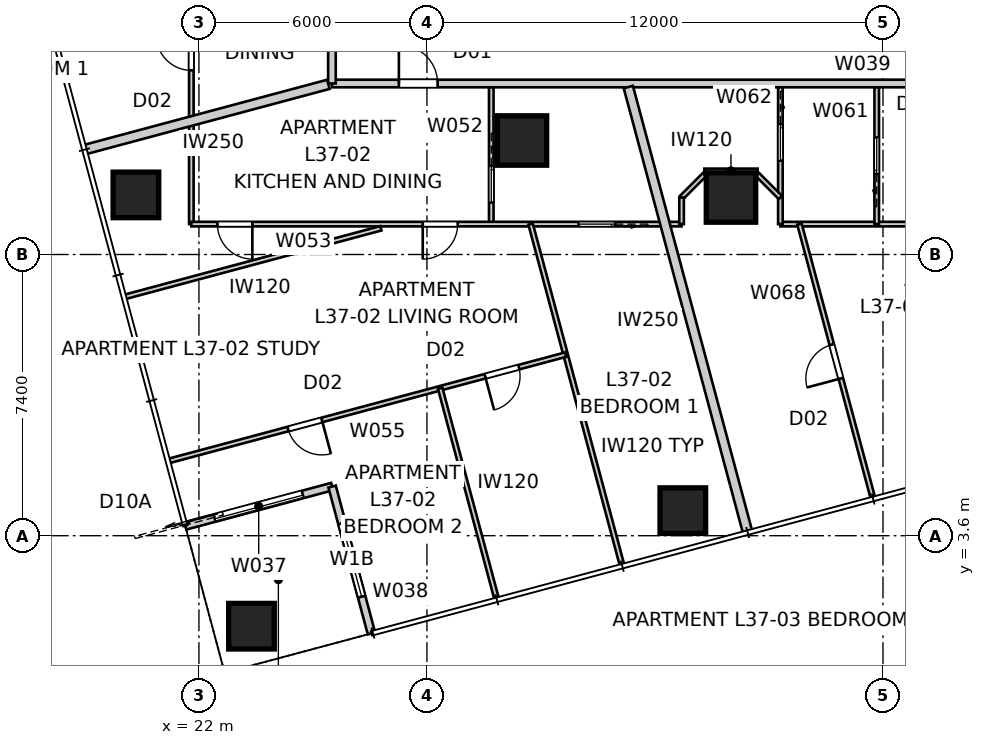
"""IFC4 building model, lengths in metres.
Left out: names, types, materials, properties, quantities, classifications, styles, units other than length and angle.
Written with IfcOpenShell. Run it as: python <this file> out.ifc"""

import sys

from ifc_helpers import new_model, si_unit, direction, frame, frame_2d, origin, origin_2d, place, context, subcontext, project, spatial, rectangle, extrude, element, fill, save


model = new_model("IFC4")
c1 = context("Model", 3, precision=1e-05, world=origin(), true_north=direction((0.0, 1.0)))
c2 = subcontext(c1, "Body", "Model", "MODEL_VIEW")
j1 = project(units=[si_unit("LENGTHUNIT", "METRE"), si_unit("PLANEANGLEUNIT", "RADIAN")], contexts=[c1])
p1 = place(None, origin())
s1 = spatial("IfcSite", under=j1, at=p1, CompositionType="ELEMENT")
p2 = place(p1, origin())
s2 = spatial("IfcBuilding", under=s1, at=p2, CompositionType="ELEMENT")
p3 = place(p2, frame((0.0, 0.0, 135.4)))
s3 = spatial("IfcBuildingStorey", under=s2, at=p3, CompositionType="ELEMENT", Elevation=135.4)
for number, where, z_axis, x_axis in (
    (1, (23.383, 1.219, 0.0), (0.0, 0.0, 1.0), (1.0, 0.0, 0.0)),
    (2, (34.733, 4.26, 0.0), (0.0, 0.0, 1.0), (1.0, 0.0, 0.0)),
    (3, (20.342, 12.568, 0.0), (0.0, 0.0, 1.0), (1.0, 0.0, 0.0)),
):
    element("IfcColumn", number, at=place(p3, frame(where, z_axis=z_axis, x_axis=x_axis)), inside=s3, PredefinedType="COLUMN", context=c2, shape_type="SweptSolid", body=[
        extrude(rectangle(XDim=1.2, YDim=1.2, at=origin_2d()), origin(), (0.0, 0.0, 1.0), 3.2),
    ])
for number, where, z_axis, x_axis in (
    (4, (30.5, 14.0, 0.0), (0.0, 0.0, 1.0), (1.0, 0.0, 0.0)),
    (5, (36.0, 12.5, 0.0), (0.0, 0.0, 1.0), (1.0, 0.0, 0.0)),
):
    element("IfcColumn", number, at=place(p3, frame(where, z_axis=z_axis, x_axis=x_axis)), inside=s3, PredefinedType="COLUMN", context=c2, shape_type="SweptSolid", body=[
        extrude(rectangle(XDim=1.3, YDim=1.3, at=origin_2d()), origin(), (0.0, 0.0, 1.0), 3.4),
    ])
p4 = place(p3, frame((21.641, 3.857, 0.0), z_axis=(0.0, 0.0, 1.0), x_axis=(0.965919172068, 0.258843877716, 0.0)))
e6 = element("IfcWall", 6, at=p4, inside=s3, PredefinedType="SOLIDWALL", context=c2, shape_type="SweptSolid", body=[
    extrude(rectangle(XDim=4.0, YDim=0.2, at=frame_2d((2.0, 0.0))), origin(), (0.0, 0.0, 1.0), 3.2),
])
p5 = place(p4, frame((0.8, 0.0, 0.0)))
e7 = element("IfcOpeningElement", 7, at=p5, cuts=e6, PredefinedType="OPENING", context=c2, shape_type="SweptSolid", body=[
    extrude(rectangle(XDim=2.4, YDim=2.1, at=frame_2d((1.2, 1.05))), frame((0.0, 0.11, 0.0), z_axis=(0.0, -1.0, 0.0), x_axis=(1.0, 0.0, 0.0)), (0.0, 0.0, 1.0), 0.22),
])
p6 = place(p3, frame((25.504, 4.893, 0.0), z_axis=(0.0, 0.0, 1.0), x_axis=(0.258786931944, -0.965934430412, 0.0)))
e8 = element("IfcWall", 8, at=p6, inside=s3, PredefinedType="SOLIDWALL", context=c2, shape_type="SweptSolid", body=[
    extrude(rectangle(XDim=4.0, YDim=0.2, at=frame_2d((2.0, 0.0))), origin(), (0.0, 0.0, 1.0), 3.2),
])
p7 = place(p6, frame((1.0, 0.0, 0.4)))
e9 = element("IfcOpeningElement", 9, at=p7, cuts=e8, PredefinedType="OPENING", context=c2, shape_type="SweptSolid", body=[
    extrude(rectangle(XDim=2.0, YDim=1.8, at=frame_2d((1.0, 0.9))), frame((0.0, 0.11, 0.0), z_axis=(0.0, -1.0, 0.0), x_axis=(1.0, 0.0, 0.0)), (0.0, 0.0, 1.0), 0.22),
])
p8 = place(p3, frame((25.5, 15.5, 0.0), z_axis=(0.0, 0.0, 1.0), x_axis=(1.0, 0.0, 0.0)))
e10 = element("IfcWall", 10, at=p8, inside=s3, PredefinedType="PARTITIONING", context=c2, shape_type="SweptSolid", body=[
    extrude(rectangle(XDim=29.0, YDim=0.2, at=frame_2d((14.5, 0.0))), origin(), (0.0, 0.0, 1.0), 3.2),
])
p9 = place(p8, frame((25.146, 0.0, 0.0)))
e11 = element("IfcOpeningElement", 11, at=p9, cuts=e10, PredefinedType="OPENING", context=c2, shape_type="SweptSolid", body=[
    extrude(rectangle(XDim=1.02, YDim=2.0, at=frame_2d((0.51, 1.0))), frame((0.0, 0.11, 0.0), z_axis=(0.0, -1.0, 0.0), x_axis=(1.0, 0.0, 0.0)), (0.0, 0.0, 1.0), 0.22),
])
p10 = place(p8, frame((1.761, 0.0, 0.0)))
e12 = element("IfcOpeningElement", 12, at=p10, cuts=e10, PredefinedType="OPENING", context=c2, shape_type="SweptSolid", body=[
    extrude(rectangle(XDim=1.02, YDim=2.34, at=frame_2d((0.51, 1.17))), frame((0.0, 0.11, 0.0), z_axis=(0.0, -1.0, 0.0), x_axis=(1.0, 0.0, 0.0)), (0.0, 0.0, 1.0), 0.22),
])
p11 = place(p3, frame((25.5, 43.7, 0.0), z_axis=(0.0, 0.0, 1.0), x_axis=(0.0, -1.0, 0.0)))
e13 = element("IfcWall", 13, at=p11, inside=s3, PredefinedType="PARTITIONING", context=c2, shape_type="SweptSolid", body=[
    extrude(rectangle(XDim=28.2, YDim=0.2, at=frame_2d((14.1, 0.0))), origin(), (0.0, 0.0, 1.0), 3.2),
])
p12 = place(p11, frame((24.646, 0.0, 0.0)))
e14 = element("IfcOpeningElement", 14, at=p12, cuts=e13, PredefinedType="OPENING", context=c2, shape_type="SweptSolid", body=[
    extrude(rectangle(XDim=1.02, YDim=2.0, at=frame_2d((0.51, 1.0))), frame((0.0, 0.11, 0.0), z_axis=(0.0, -1.0, 0.0), x_axis=(1.0, 0.0, 0.0)), (0.0, 0.0, 1.0), 0.22),
])
p13 = place(p11, frame((14.858, 0.0, 0.0)))
e15 = element("IfcOpeningElement", 15, at=p13, cuts=e13, PredefinedType="OPENING", context=c2, shape_type="SweptSolid", body=[
    extrude(rectangle(XDim=1.02, YDim=2.34, at=frame_2d((0.51, 1.17))), frame((0.0, 0.11, 0.0), z_axis=(0.0, -1.0, 0.0), x_axis=(1.0, 0.0, 0.0)), (0.0, 0.0, 1.0), 0.22),
])
p14 = place(p11, frame((1.347, 0.0, 0.0)))
e16 = element("IfcOpeningElement", 16, at=p14, cuts=e13, PredefinedType="OPENING", context=c2, shape_type="SweptSolid", body=[
    extrude(rectangle(XDim=1.02, YDim=2.0, at=frame_2d((0.51, 1.0))), frame((0.0, 0.11, 0.0), z_axis=(0.0, -1.0, 0.0), x_axis=(1.0, 0.0, 0.0)), (0.0, 0.0, 1.0), 0.22),
])
p15 = place(p3, frame((36.44, 3.682, 0.0), z_axis=(0.0, 0.0, 1.0), x_axis=(-0.258824223352, 0.965924438766, 0.0)))
e17 = element("IfcWall", 17, at=p15, inside=s3, PredefinedType="PARTITIONING", context=c2, shape_type="SweptSolid", body=[
    extrude(rectangle(XDim=12.138, YDim=0.25, at=frame_2d((6.069, 0.0))), origin(), (0.0, 0.0, 1.0), 3.2),
])
p16 = place(p3, frame((18.988, 13.758, 0.0), z_axis=(0.0, 0.0, 1.0), x_axis=(0.965929355837, 0.25880587229, 0.0)))
e18 = element("IfcWall", 18, at=p16, inside=s3, PredefinedType="PARTITIONING", context=c2, shape_type="SweptSolid", body=[
    extrude(rectangle(XDim=6.645, YDim=0.25, at=frame_2d((3.322, 0.0))), origin(), (0.0, 0.0, 1.0), 3.2),
])
p17 = place(p3, frame((21.8, 11.8, 0.0), z_axis=(0.0, 0.0, 1.0), x_axis=(0.0, 1.0, 0.0)))
e19 = element("IfcWall", 19, at=p17, inside=s3, PredefinedType="PARTITIONING", context=c2, shape_type="SweptSolid", body=[
    extrude(rectangle(XDim=21.116, YDim=0.12, at=frame_2d((10.558, 0.0))), origin(), (0.0, 0.0, 1.0), 3.2),
])
p18 = place(p17, frame((4.046, 0.0, 0.0)))
e20 = element("IfcOpeningElement", 20, at=p18, cuts=e19, PredefinedType="OPENING", context=c2, shape_type="SweptSolid", body=[
    extrude(rectangle(XDim=0.92, YDim=2.34, at=frame_2d((0.46, 1.17))), frame((0.0, 0.07, 0.0), z_axis=(0.0, -1.0, 0.0), x_axis=(1.0, 0.0, 0.0)), (0.0, 0.0, 1.0), 0.14),
])
p19 = place(p17, frame((7.358, 0.0, 0.0)))
e21 = element("IfcOpeningElement", 21, at=p19, cuts=e19, PredefinedType="OPENING", context=c2, shape_type="SweptSolid", body=[
    extrude(rectangle(XDim=0.92, YDim=2.34, at=frame_2d((0.46, 1.17))), frame((0.0, 0.07, 0.0), z_axis=(0.0, -1.0, 0.0), x_axis=(1.0, 0.0, 0.0)), (0.0, 0.0, 1.0), 0.14),
])
p20 = place(p17, frame((14.958, 0.0, 0.0)))
e22 = element("IfcOpeningElement", 22, at=p20, cuts=e19, PredefinedType="OPENING", context=c2, shape_type="SweptSolid", body=[
    extrude(rectangle(XDim=0.92, YDim=2.34, at=frame_2d((0.46, 1.17))), frame((0.0, 0.07, 0.0), z_axis=(0.0, -1.0, 0.0), x_axis=(1.0, 0.0, 0.0)), (0.0, 0.0, 1.0), 0.14),
])
p21 = place(p17, frame((17.31, 0.0, 0.0)))
e23 = element("IfcOpeningElement", 23, at=p21, cuts=e19, PredefinedType="OPENING", context=c2, shape_type="SweptSolid", body=[
    extrude(rectangle(XDim=0.92, YDim=2.34, at=frame_2d((0.46, 1.17))), frame((0.0, 0.07, 0.0), z_axis=(0.0, -1.0, 0.0), x_axis=(1.0, 0.0, 0.0)), (0.0, 0.0, 1.0), 0.14),
])
p22 = place(p3, frame((29.692, 15.4, 0.0), z_axis=(0.0, 0.0, 1.0), x_axis=(0.0, -1.0, 0.0)))
e24 = element("IfcWall", 24, at=p22, inside=s3, PredefinedType="PARTITIONING", context=c2, shape_type="SweptSolid", body=[
    extrude(rectangle(XDim=3.6, YDim=0.12, at=frame_2d((1.8, 0.0))), origin(), (0.0, 0.0, 1.0), 3.2),
])
p23 = place(p22, frame((2.07, 0.0, 0.0)))
e25 = element("IfcOpeningElement", 25, at=p23, cuts=e24, PredefinedType="OPENING", context=c2, shape_type="SweptSolid", body=[
    extrude(rectangle(XDim=0.96, YDim=2.1, at=frame_2d((0.48, 1.05))), frame((0.0, 0.07, 0.0), z_axis=(0.0, -1.0, 0.0), x_axis=(1.0, 0.0, 0.0)), (0.0, 0.0, 1.0), 0.14),
])
p24 = place(p3, frame((34.7, 11.8, 0.0), z_axis=(0.0, 0.0, 1.0), x_axis=(-1.0, 0.0, 0.0)))
e26 = element("IfcWall", 26, at=p24, inside=s3, PredefinedType="PARTITIONING", context=c2, shape_type="SweptSolid", body=[
    extrude(rectangle(XDim=12.9, YDim=0.12, at=frame_2d((6.45, 0.0))), origin(), (0.0, 0.0, 1.0), 2.399),
])
p25 = place(p24, frame((11.294, 0.0, 0.0)))
e27 = element("IfcOpeningElement", 27, at=p25, cuts=e26, PredefinedType="OPENING", context=c2, shape_type="SweptSolid", body=[
    extrude(rectangle(XDim=0.92, YDim=2.34, at=frame_2d((0.46, 1.17))), frame((0.0, 0.07, 0.0), z_axis=(0.0, -1.0, 0.0), x_axis=(1.0, 0.0, 0.0)), (0.0, 0.0, 1.0), 0.14),
])
p26 = place(p24, frame((5.891, 0.0, 0.0)))
e28 = element("IfcOpeningElement", 28, at=p26, cuts=e26, PredefinedType="OPENING", context=c2, shape_type="SweptSolid", body=[
    extrude(rectangle(XDim=0.92, YDim=2.34, at=frame_2d((0.46, 1.17))), frame((0.0, 0.07, 0.0), z_axis=(0.0, -1.0, 0.0), x_axis=(1.0, 0.0, 0.0)), (0.0, 0.0, 1.0), 0.14),
])
p27 = place(p24, frame((1.75, 0.0, 0.0)))
e29 = element("IfcOpeningElement", 29, at=p27, cuts=e26, PredefinedType="OPENING", context=c2, shape_type="SweptSolid", body=[
    extrude(rectangle(XDim=0.96, YDim=2.1, at=frame_2d((0.48, 1.05))), frame((0.0, 0.07, 0.0), z_axis=(0.0, -1.0, 0.0), x_axis=(1.0, 0.0, 0.0)), (0.0, 0.0, 1.0), 0.14),
])
p28 = place(p3, frame((30.728, 11.8, 0.0), z_axis=(0.0, 0.0, 1.0), x_axis=(0.258818491613, -0.965925974596, 0.0)))
e30 = element("IfcWall", 30, at=p28, inside=s3, PredefinedType="PARTITIONING", context=c2, shape_type="SweptSolid", body=[
    extrude(rectangle(XDim=9.28, YDim=0.12, at=frame_2d((4.64, 0.0))), origin(), (0.0, 0.0, 1.0), 2.588),
])
p29 = place(p3, frame((31.648, 8.365, 0.0), z_axis=(0.0, 0.0, 1.0), x_axis=(-0.965925636365, -0.258819753906, 0.0)))
e31 = element("IfcWall", 31, at=p29, inside=s3, PredefinedType="PARTITIONING", context=c2, shape_type="SweptSolid", body=[
    extrude(rectangle(XDim=10.793, YDim=0.12, at=frame_2d((5.396, 0.0))), origin(), (0.0, 0.0, 1.0), 3.2),
])
p30 = place(p29, frame((6.64, 0.0, 0.0)))
e32 = element("IfcOpeningElement", 32, at=p30, cuts=e31, PredefinedType="OPENING", context=c2, shape_type="SweptSolid", body=[
    extrude(rectangle(XDim=0.92, YDim=2.34, at=frame_2d((0.46, 1.17))), frame((0.0, 0.07, 0.0), z_axis=(0.0, -1.0, 0.0), x_axis=(1.0, 0.0, 0.0)), (0.0, 0.0, 1.0), 0.14),
])
p31 = place(p29, frame((1.273, 0.0, 0.0)))
e33 = element("IfcOpeningElement", 33, at=p31, cuts=e31, PredefinedType="OPENING", context=c2, shape_type="SweptSolid", body=[
    extrude(rectangle(XDim=0.92, YDim=2.34, at=frame_2d((0.46, 1.17))), frame((0.0, 0.07, 0.0), z_axis=(0.0, -1.0, 0.0), x_axis=(1.0, 0.0, 0.0)), (0.0, 0.0, 1.0), 0.14),
])
p32 = place(p3, frame((20.066, 9.889, 0.0), z_axis=(0.0, 0.0, 1.0), x_axis=(0.965925659778, 0.258819666528, 0.0)))
e34 = element("IfcWall", 34, at=p32, inside=s3, PredefinedType="PARTITIONING", context=c2, shape_type="SweptSolid", body=[
    extrude(rectangle(XDim=6.959, YDim=0.12, at=frame_2d((3.48, 0.0))), origin(), (0.0, 0.0, 1.0), 3.2),
])
p33 = place(p3, frame((28.348, 7.48, 0.0), z_axis=(0.0, 0.0, 1.0), x_axis=(0.258830607795, -0.965922728001, 0.0)))
e35 = element("IfcWall", 35, at=p33, inside=s3, PredefinedType="PARTITIONING", context=c2, shape_type="SweptSolid", body=[
    extrude(rectangle(XDim=5.724, YDim=0.12, at=frame_2d((2.862, 0.0))), origin(), (0.0, 0.0, 1.0), 3.2),
])
p34 = place(p3, frame((58.2, 11.8, 0.0), z_axis=(0.0, 0.0, 1.0), x_axis=(-1.0, 0.0, 0.0)))
e36 = element("IfcWall", 36, at=p34, inside=s3, PredefinedType="PARTITIONING", context=c2, shape_type="SweptSolid", body=[
    extrude(rectangle(XDim=20.9, YDim=0.12, at=frame_2d((10.45, 0.0))), origin(), (0.0, 0.0, 1.0), 3.2),
])
p35 = place(p34, frame((7.807, 0.0, 0.0)))
e37 = element("IfcOpeningElement", 37, at=p35, cuts=e36, PredefinedType="OPENING", context=c2, shape_type="SweptSolid", body=[
    extrude(rectangle(XDim=0.92, YDim=2.34, at=frame_2d((0.46, 1.17))), frame((0.0, 0.07, 0.0), z_axis=(0.0, -1.0, 0.0), x_axis=(1.0, 0.0, 0.0)), (0.0, 0.0, 1.0), 0.14),
])
p36 = place(p34, frame((4.046, 0.0, 0.0)))
e38 = element("IfcOpeningElement", 38, at=p36, cuts=e36, PredefinedType="OPENING", context=c2, shape_type="SweptSolid", body=[
    extrude(rectangle(XDim=0.92, YDim=2.34, at=frame_2d((0.46, 1.17))), frame((0.0, 0.07, 0.0), z_axis=(0.0, -1.0, 0.0), x_axis=(1.0, 0.0, 0.0)), (0.0, 0.0, 1.0), 0.14),
])
p37 = place(p34, frame((15.602, 0.0, 0.0)))
e39 = element("IfcOpeningElement", 39, at=p37, cuts=e36, PredefinedType="OPENING", context=c2, shape_type="SweptSolid", body=[
    extrude(rectangle(XDim=0.96, YDim=2.1, at=frame_2d((0.48, 1.05))), frame((0.0, 0.07, 0.0), z_axis=(0.0, -1.0, 0.0), x_axis=(1.0, 0.0, 0.0)), (0.0, 0.0, 1.0), 0.14),
])
p38 = place(p3, frame((39.835, 11.8, 0.0), z_axis=(0.0, 0.0, 1.0), x_axis=(0.0, 1.0, 0.0)))
e40 = element("IfcWall", 40, at=p38, inside=s3, PredefinedType="PARTITIONING", context=c2, shape_type="SweptSolid", body=[
    extrude(rectangle(XDim=3.6, YDim=0.12, at=frame_2d((1.8, 0.0))), origin(), (0.0, 0.0, 1.0), 3.2),
])
p39 = place(p38, frame((1.32, 0.0, 0.0)))
e41 = element("IfcOpeningElement", 41, at=p39, cuts=e40, PredefinedType="OPENING", context=c2, shape_type="SweptSolid", body=[
    extrude(rectangle(XDim=0.96, YDim=2.1, at=frame_2d((0.48, 1.05))), frame((0.0, 0.07, 0.0), z_axis=(0.0, -1.0, 0.0), x_axis=(1.0, 0.0, 0.0)), (0.0, 0.0, 1.0), 0.14),
])
p40 = place(p3, frame((37.3, 15.4, 0.0), z_axis=(0.0, 0.0, 1.0), x_axis=(0.0, -1.0, 0.0)))
e42 = element("IfcWall", 42, at=p40, inside=s3, PredefinedType="PARTITIONING", context=c2, shape_type="SweptSolid", body=[
    extrude(rectangle(XDim=3.6, YDim=0.12, at=frame_2d((1.8, 0.0))), origin(), (0.0, 0.0, 1.0), 3.2),
])
p41 = place(p40, frame((0.97, 0.0, 0.0)))
e43 = element("IfcOpeningElement", 43, at=p41, cuts=e42, PredefinedType="OPENING", context=c2, shape_type="SweptSolid", body=[
    extrude(rectangle(XDim=0.96, YDim=2.1, at=frame_2d((0.48, 1.05))), frame((0.0, 0.07, 0.0), z_axis=(0.0, -1.0, 0.0), x_axis=(1.0, 0.0, 0.0)), (0.0, 0.0, 1.0), 0.14),
])
p42 = place(p3, frame((37.3, 12.5, 0.0), z_axis=(0.0, 0.0, 1.0), x_axis=(-0.707106781187, 0.707106781187, 0.0)))
e44 = element("IfcWall", 44, at=p42, inside=s3, PredefinedType="PARTITIONING", context=c2, shape_type="SweptSolid", body=[
    extrude(rectangle(XDim=0.849, YDim=0.12, at=frame_2d((0.424, 0.0))), origin(), (0.0, 0.0, 1.0), 3.2),
])
p43 = place(p3, frame((36.7, 13.2, 0.0), z_axis=(0.0, 0.0, 1.0), x_axis=(-1.0, 0.0, 0.0)))
e45 = element("IfcWall", 45, at=p43, inside=s3, PredefinedType="PARTITIONING", context=c2, shape_type="SweptSolid", body=[
    extrude(rectangle(XDim=1.4, YDim=0.12, at=frame_2d((0.7, 0.0))), origin(), (0.0, 0.0, 1.0), 3.2),
])
p44 = place(p3, frame((35.3, 13.1, 0.0), z_axis=(0.0, 0.0, 1.0), x_axis=(-0.707106781187, -0.707106781187, 0.0)))
e46 = element("IfcWall", 46, at=p44, inside=s3, PredefinedType="PARTITIONING", context=c2, shape_type="SweptSolid", body=[
    extrude(rectangle(XDim=0.849, YDim=0.12, at=frame_2d((0.424, 0.0))), origin(), (0.0, 0.0, 1.0), 3.2),
])
p45 = place(p3, frame((34.7, 12.5, 0.0), z_axis=(0.0, 0.0, 1.0), x_axis=(0.0, -1.0, 0.0)))
e47 = element("IfcWall", 47, at=p45, inside=s3, PredefinedType="PARTITIONING", context=c2, shape_type="SweptSolid", body=[
    extrude(rectangle(XDim=0.7, YDim=0.12, at=frame_2d((0.35, 0.0))), origin(), (0.0, 0.0, 1.0), 3.2),
])
p46 = place(p3, frame((39.73, 4.605, 0.0), z_axis=(0.0, 0.0, 1.0), x_axis=(-0.258819087933, 0.965925814813, 0.0)))
e48 = element("IfcWall", 48, at=p46, inside=s3, PredefinedType="PARTITIONING", context=c2, shape_type="SweptSolid", body=[
    extrude(rectangle(XDim=7.449, YDim=0.12, at=frame_2d((3.725, 0.0))), origin(), (0.0, 0.0, 1.0), 3.2),
])
p47 = place(p46, frame((3.244, 0.0, 0.0)))
e49 = element("IfcOpeningElement", 49, at=p47, cuts=e48, PredefinedType="OPENING", context=c2, shape_type="SweptSolid", body=[
    extrude(rectangle(XDim=0.92, YDim=2.34, at=frame_2d((0.46, 1.17))), frame((0.0, 0.07, 0.0), z_axis=(0.0, -1.0, 0.0), x_axis=(1.0, 0.0, 0.0)), (0.0, 0.0, 1.0), 0.14),
])
p48 = place(p5, origin())
e50 = element("IfcDoor", 50, at=p48, inside=s3, OperationType="SLIDING_TO_LEFT", PredefinedType="DOOR", context=c2, shape_type="SweptSolid", body=[
    extrude(rectangle(XDim=2.4, YDim=2.1, at=frame_2d((1.2, 1.05))), frame((0.0, 0.025, 0.0), z_axis=(0.0, -1.0, 0.0), x_axis=(1.0, 0.0, 0.0)), (0.0, 0.0, 1.0), 0.05),
])
fill(e7, e50)
p49 = place(p7, origin())
e51 = element("IfcWindow", 51, at=p49, inside=s3, PartitioningType="SINGLE_PANEL", PredefinedType="WINDOW", context=c2, shape_type="SweptSolid", body=[
    extrude(rectangle(XDim=2.0, YDim=1.8, at=frame_2d((1.0, 0.9))), frame((0.0, 0.03, 0.0), z_axis=(0.0, -1.0, 0.0), x_axis=(1.0, 0.0, 0.0)), (0.0, 0.0, 1.0), 0.06),
])
fill(e9, e51)
p50 = place(p10, origin())
e52 = element("IfcDoor", 52, at=p50, inside=s3, OperationType="SINGLE_SWING_LEFT", PredefinedType="DOOR", context=c2, shape_type="SweptSolid", body=[
    extrude(rectangle(XDim=1.02, YDim=2.34, at=frame_2d((0.51, 1.17))), frame((0.0, 0.025, 0.0), z_axis=(0.0, -1.0, 0.0), x_axis=(1.0, 0.0, 0.0)), (0.0, 0.0, 1.0), 0.05),
])
fill(e12, e52)
p51 = place(p18, origin())
e53 = element("IfcDoor", 53, at=p51, inside=s3, OperationType="SINGLE_SWING_RIGHT", PredefinedType="DOOR", context=c2, shape_type="SweptSolid", body=[
    extrude(rectangle(XDim=0.92, YDim=2.34, at=frame_2d((0.46, 1.17))), frame((0.0, 0.025, 0.0), z_axis=(0.0, -1.0, 0.0), x_axis=(1.0, 0.0, 0.0)), (0.0, 0.0, 1.0), 0.05),
])
fill(e20, e53)
p52 = place(p25, origin())
e54 = element("IfcDoor", 54, at=p52, inside=s3, OperationType="SINGLE_SWING_LEFT", PredefinedType="DOOR", context=c2, shape_type="SweptSolid", body=[
    extrude(rectangle(XDim=0.92, YDim=2.34, at=frame_2d((0.46, 1.17))), frame((0.0, 0.025, 0.0), z_axis=(0.0, -1.0, 0.0), x_axis=(1.0, 0.0, 0.0)), (0.0, 0.0, 1.0), 0.05),
])
fill(e27, e54)
p53 = place(p23, origin())
e55 = element("IfcDoor", 55, at=p53, inside=s3, OperationType="SLIDING_TO_LEFT", PredefinedType="DOOR", context=c2, shape_type="SweptSolid", body=[
    extrude(rectangle(XDim=0.96, YDim=2.1, at=frame_2d((0.48, 1.05))), frame((0.0, 0.025, 0.0), z_axis=(0.0, -1.0, 0.0), x_axis=(1.0, 0.0, 0.0)), (0.0, 0.0, 1.0), 0.05),
])
fill(e25, e55)
p54 = place(p26, origin())
e56 = element("IfcDoor", 56, at=p54, inside=s3, OperationType="SINGLE_SWING_RIGHT", PredefinedType="DOOR", context=c2, shape_type="SweptSolid", body=[
    extrude(rectangle(XDim=0.92, YDim=2.34, at=frame_2d((0.46, 1.17))), frame((0.0, 0.025, 0.0), z_axis=(0.0, -1.0, 0.0), x_axis=(1.0, 0.0, 0.0)), (0.0, 0.0, 1.0), 0.05),
])
fill(e28, e56)
p55 = place(p27, origin())
e57 = element("IfcDoor", 57, at=p55, inside=s3, OperationType="SLIDING_TO_LEFT", PredefinedType="DOOR", context=c2, shape_type="SweptSolid", body=[
    extrude(rectangle(XDim=0.96, YDim=2.1, at=frame_2d((0.48, 1.05))), frame((0.0, 0.025, 0.0), z_axis=(0.0, -1.0, 0.0), x_axis=(1.0, 0.0, 0.0)), (0.0, 0.0, 1.0), 0.05),
])
fill(e29, e57)
p56 = place(p30, origin())
e58 = element("IfcDoor", 58, at=p56, inside=s3, OperationType="SINGLE_SWING_LEFT", PredefinedType="DOOR", context=c2, shape_type="SweptSolid", body=[
    extrude(rectangle(XDim=0.92, YDim=2.34, at=frame_2d((0.46, 1.17))), frame((0.0, 0.025, 0.0), z_axis=(0.0, -1.0, 0.0), x_axis=(1.0, 0.0, 0.0)), (0.0, 0.0, 1.0), 0.05),
])
fill(e32, e58)
p57 = place(p31, origin())
e59 = element("IfcDoor", 59, at=p57, inside=s3, OperationType="SINGLE_SWING_RIGHT", PredefinedType="DOOR", context=c2, shape_type="SweptSolid", body=[
    extrude(rectangle(XDim=0.92, YDim=2.34, at=frame_2d((0.46, 1.17))), frame((0.0, 0.025, 0.0), z_axis=(0.0, -1.0, 0.0), x_axis=(1.0, 0.0, 0.0)), (0.0, 0.0, 1.0), 0.05),
])
fill(e33, e59)
p58 = place(p39, origin())
e60 = element("IfcDoor", 60, at=p58, inside=s3, OperationType="SLIDING_TO_LEFT", PredefinedType="DOOR", context=c2, shape_type="SweptSolid", body=[
    extrude(rectangle(XDim=0.96, YDim=2.1, at=frame_2d((0.48, 1.05))), frame((0.0, 0.025, 0.0), z_axis=(0.0, -1.0, 0.0), x_axis=(1.0, 0.0, 0.0)), (0.0, 0.0, 1.0), 0.05),
])
fill(e41, e60)
p59 = place(p47, origin())
e61 = element("IfcDoor", 61, at=p59, inside=s3, OperationType="SINGLE_SWING_LEFT", PredefinedType="DOOR", context=c2, shape_type="SweptSolid", body=[
    extrude(rectangle(XDim=0.92, YDim=2.34, at=frame_2d((0.46, 1.17))), frame((0.0, 0.025, 0.0), z_axis=(0.0, -1.0, 0.0), x_axis=(1.0, 0.0, 0.0)), (0.0, 0.0, 1.0), 0.05),
])
fill(e49, e61)
p60 = place(p41, origin())
e62 = element("IfcDoor", 62, at=p60, inside=s3, OperationType="SLIDING_TO_LEFT", PredefinedType="DOOR", context=c2, shape_type="SweptSolid", body=[
    extrude(rectangle(XDim=0.96, YDim=2.1, at=frame_2d((0.48, 1.05))), frame((0.0, 0.025, 0.0), z_axis=(0.0, -1.0, 0.0), x_axis=(1.0, 0.0, 0.0)), (0.0, 0.0, 1.0), 0.05),
])
fill(e43, e62)
save(model, sys.argv[1])
